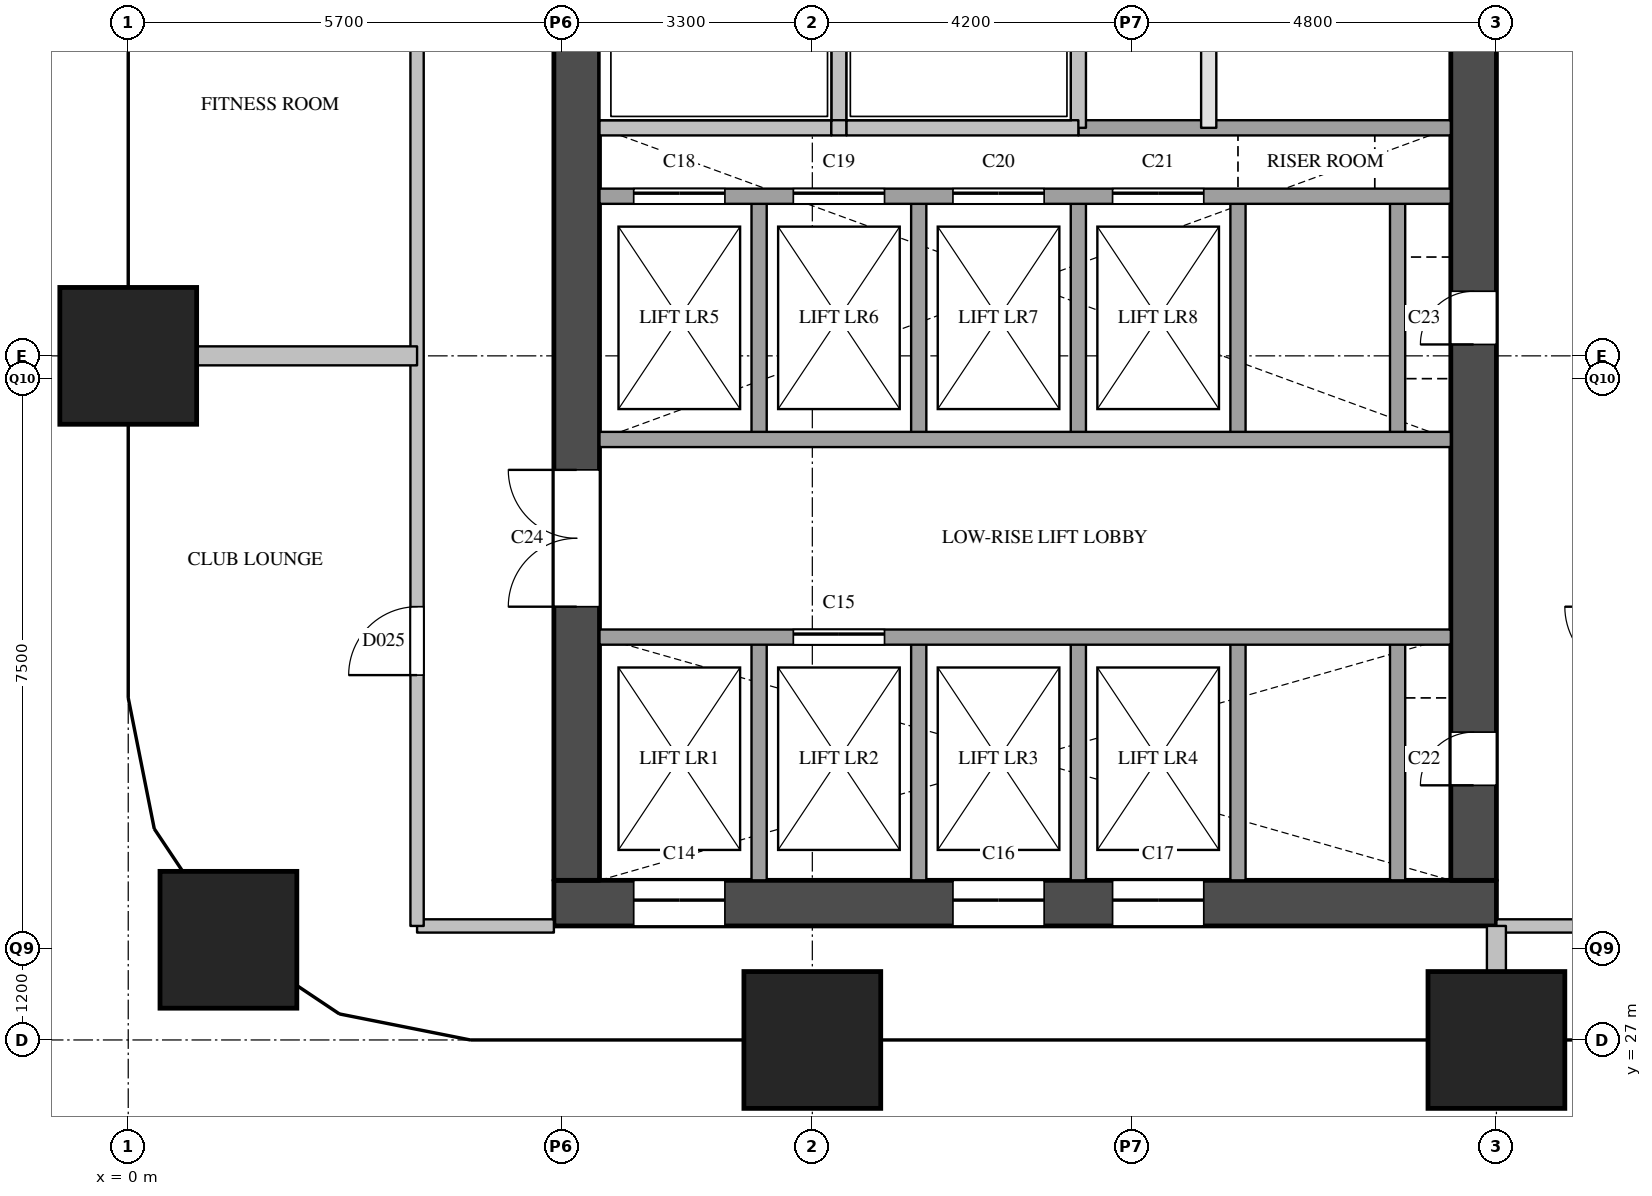
"""IFC4 building model, lengths in metres.
Left out: names, types, materials, properties, quantities, classifications, styles, units other than length and angle.
Written with IfcOpenShell. Run it as: python <this file> out.ifc"""

import sys

from ifc_helpers import new_model, si_unit, direction, frame, frame_2d, origin, origin_2d, place, context, subcontext, project, spatial, rectangle, extrude, element, fill, save


model = new_model("IFC4")
c1 = context("Model", 3, precision=1e-05, world=origin(), true_north=direction((0.0, 1.0)))
c2 = subcontext(c1, "Body", "Model", "MODEL_VIEW")
j1 = project(units=[si_unit("LENGTHUNIT", "METRE"), si_unit("PLANEANGLEUNIT", "RADIAN")], contexts=[c1])
p1 = place(None, origin())
s1 = spatial("IfcSite", under=j1, at=p1, CompositionType="ELEMENT")
p2 = place(p1, origin())
s2 = spatial("IfcBuilding", under=s1, at=p2, CompositionType="ELEMENT")
p3 = place(p2, frame((0.0, 0.0, 112.0)))
s3 = spatial("IfcBuildingStorey", under=s2, at=p3, CompositionType="ELEMENT", Elevation=112.0)
for number, where, z_axis, x_axis in (
    (1, (1.318, 28.318, 0.0), (0.0, 0.0, 1.0), (1.0, 0.0, 0.0)),
    (2, (0.0, 36.0, 0.0), (0.0, 0.0, 1.0), (1.0, 0.0, 0.0)),
    (3, (9.0, 27.0, 0.0), (0.0, 0.0, 1.0), (1.0, 0.0, 0.0)),
    (4, (18.0, 27.0, 0.0), (0.0, 0.0, 1.0), (1.0, 0.0, 0.0)),
):
    element("IfcColumn", number, at=place(p3, frame(where, z_axis=z_axis, x_axis=x_axis)), inside=s3, PredefinedType="COLUMN", context=c2, shape_type="SweptSolid", body=[
        extrude(rectangle(XDim=1.8, YDim=1.8, at=origin_2d()), origin(), (0.0, 0.0, 1.0), 3.8),
    ])
p4 = place(p3, frame((5.6, 28.8, 0.0), z_axis=(0.0, 0.0, 1.0), x_axis=(1.0, 0.0, 0.0)))
e5 = element("IfcWall", 5, at=p4, inside=s3, PredefinedType="SHEAR", context=c2, shape_type="SweptSolid", body=[
    extrude(rectangle(XDim=12.4, YDim=0.6, at=frame_2d((6.2, 0.0))), origin(), (0.0, 0.0, 1.0), 3.5),
])
p5 = place(p4, frame((1.05, 0.0, 0.0)))
e6 = element("IfcOpeningElement", 6, at=p5, cuts=e5, PredefinedType="OPENING", context=c2, shape_type="SweptSolid", body=[
    extrude(rectangle(XDim=1.2, YDim=2.1, at=frame_2d((0.6, 1.05))), frame((0.0, 0.31, 0.0), z_axis=(0.0, -1.0, 0.0), x_axis=(1.0, 0.0, 0.0)), (0.0, 0.0, 1.0), 0.62),
])
p6 = place(p4, frame((5.25, 0.0, 0.0)))
e7 = element("IfcOpeningElement", 7, at=p6, cuts=e5, PredefinedType="OPENING", context=c2, shape_type="SweptSolid", body=[
    extrude(rectangle(XDim=1.2, YDim=2.1, at=frame_2d((0.6, 1.05))), frame((0.0, 0.31, 0.0), z_axis=(0.0, -1.0, 0.0), x_axis=(1.0, 0.0, 0.0)), (0.0, 0.0, 1.0), 0.62),
])
p7 = place(p4, frame((7.35, 0.0, 0.0)))
e8 = element("IfcOpeningElement", 8, at=p7, cuts=e5, PredefinedType="OPENING", context=c2, shape_type="SweptSolid", body=[
    extrude(rectangle(XDim=1.2, YDim=2.1, at=frame_2d((0.6, 1.05))), frame((0.0, 0.31, 0.0), z_axis=(0.0, -1.0, 0.0), x_axis=(1.0, 0.0, 0.0)), (0.0, 0.0, 1.0), 0.62),
])
p8 = place(p3, frame((5.9, 29.1, 0.0), z_axis=(0.0, 0.0, 1.0), x_axis=(0.0, 1.0, 0.0)))
e9 = element("IfcWall", 9, at=p8, inside=s3, PredefinedType="SHEAR", context=c2, shape_type="SweptSolid", body=[
    extrude(rectangle(XDim=20.3, YDim=0.6, at=frame_2d((10.15, 0.0))), origin(), (0.0, 0.0, 1.0), 3.5),
])
p9 = place(p8, frame((3.6, 0.0, 0.0)))
e10 = element("IfcOpeningElement", 10, at=p9, cuts=e9, PredefinedType="OPENING", context=c2, shape_type="SweptSolid", body=[
    extrude(rectangle(XDim=1.8, YDim=2.1, at=frame_2d((0.9, 1.05))), frame((0.0, 0.31, 0.0), z_axis=(0.0, -1.0, 0.0), x_axis=(1.0, 0.0, 0.0)), (0.0, 0.0, 1.0), 0.62),
])
p10 = place(p8, frame((16.4, 0.0, 0.0)))
e11 = element("IfcOpeningElement", 11, at=p10, cuts=e9, PredefinedType="OPENING", context=c2, shape_type="SweptSolid", body=[
    extrude(rectangle(XDim=1.0, YDim=2.1, at=frame_2d((0.5, 1.05))), frame((0.0, 0.31, 0.0), z_axis=(0.0, -1.0, 0.0), x_axis=(1.0, 0.0, 0.0)), (0.0, 0.0, 1.0), 0.62),
])
p11 = place(p3, frame((17.7, 29.1, 0.0), z_axis=(0.0, 0.0, 1.0), x_axis=(0.0, 1.0, 0.0)))
e12 = element("IfcWall", 12, at=p11, inside=s3, PredefinedType="SHEAR", context=c2, shape_type="SweptSolid", body=[
    extrude(rectangle(XDim=20.3, YDim=0.6, at=frame_2d((10.15, 0.0))), origin(), (0.0, 0.0, 1.0), 3.5),
])
p12 = place(p11, frame((1.25, 0.0, 0.0)))
e13 = element("IfcOpeningElement", 13, at=p12, cuts=e12, PredefinedType="OPENING", context=c2, shape_type="SweptSolid", body=[
    extrude(rectangle(XDim=0.7, YDim=2.1, at=frame_2d((0.35, 1.05))), frame((0.0, 0.31, 0.0), z_axis=(0.0, -1.0, 0.0), x_axis=(1.0, 0.0, 0.0)), (0.0, 0.0, 1.0), 0.62),
])
p13 = place(p11, frame((7.05, 0.0, 0.0)))
e14 = element("IfcOpeningElement", 14, at=p13, cuts=e12, PredefinedType="OPENING", context=c2, shape_type="SweptSolid", body=[
    extrude(rectangle(XDim=0.7, YDim=2.1, at=frame_2d((0.35, 1.05))), frame((0.0, 0.31, 0.0), z_axis=(0.0, -1.0, 0.0), x_axis=(1.0, 0.0, 0.0)), (0.0, 0.0, 1.0), 0.62),
])
p14 = place(p3, frame((8.3, 29.1, 0.0), z_axis=(0.0, 0.0, 1.0), x_axis=(0.0, 1.0, 0.0)))
e15 = element("IfcWall", 15, at=p14, inside=s3, PredefinedType="SOLIDWALL", context=c2, shape_type="SweptSolid", body=[
    extrude(rectangle(XDim=3.2, YDim=0.2, at=frame_2d((1.6, 0.0))), origin(), (0.0, 0.0, 1.0), 3.5),
])
p15 = place(p3, frame((8.3, 34.9, 0.0), z_axis=(0.0, 0.0, 1.0), x_axis=(0.0, 1.0, 0.0)))
e16 = element("IfcWall", 16, at=p15, inside=s3, PredefinedType="SOLIDWALL", context=c2, shape_type="SweptSolid", body=[
    extrude(rectangle(XDim=3.2, YDim=0.2, at=frame_2d((1.6, 0.0))), origin(), (0.0, 0.0, 1.0), 3.5),
])
p16 = place(p3, frame((9.35, 39.0, 0.0), z_axis=(0.0, 0.0, 1.0), x_axis=(0.0, 1.0, 0.0)))
e17 = element("IfcWall", 17, at=p16, inside=s3, PredefinedType="SOLIDWALL", context=c2, shape_type="SweptSolid", body=[
    extrude(rectangle(XDim=1.9, YDim=0.2, at=frame_2d((0.95, 0.0))), origin(), (0.0, 0.0, 1.0), 3.5),
])
p17 = place(p3, frame((10.4, 29.1, 0.0), z_axis=(0.0, 0.0, 1.0), x_axis=(0.0, 1.0, 0.0)))
e18 = element("IfcWall", 18, at=p17, inside=s3, PredefinedType="SOLIDWALL", context=c2, shape_type="SweptSolid", body=[
    extrude(rectangle(XDim=3.2, YDim=0.2, at=frame_2d((1.6, 0.0))), origin(), (0.0, 0.0, 1.0), 3.5),
])
p18 = place(p3, frame((10.4, 34.9, 0.0), z_axis=(0.0, 0.0, 1.0), x_axis=(0.0, 1.0, 0.0)))
e19 = element("IfcWall", 19, at=p18, inside=s3, PredefinedType="SOLIDWALL", context=c2, shape_type="SweptSolid", body=[
    extrude(rectangle(XDim=3.2, YDim=0.2, at=frame_2d((1.6, 0.0))), origin(), (0.0, 0.0, 1.0), 3.5),
])
p19 = place(p3, frame((12.5, 29.1, 0.0), z_axis=(0.0, 0.0, 1.0), x_axis=(0.0, 1.0, 0.0)))
e20 = element("IfcWall", 20, at=p19, inside=s3, PredefinedType="SOLIDWALL", context=c2, shape_type="SweptSolid", body=[
    extrude(rectangle(XDim=3.2, YDim=0.2, at=frame_2d((1.6, 0.0))), origin(), (0.0, 0.0, 1.0), 3.5),
])
p20 = place(p3, frame((12.5, 34.9, 0.0), z_axis=(0.0, 0.0, 1.0), x_axis=(0.0, 1.0, 0.0)))
e21 = element("IfcWall", 21, at=p20, inside=s3, PredefinedType="SOLIDWALL", context=c2, shape_type="SweptSolid", body=[
    extrude(rectangle(XDim=3.2, YDim=0.2, at=frame_2d((1.6, 0.0))), origin(), (0.0, 0.0, 1.0), 3.5),
])
p21 = place(p3, frame((12.5, 39.0, 0.0), z_axis=(0.0, 0.0, 1.0), x_axis=(0.0, 1.0, 0.0)))
e22 = element("IfcWall", 22, at=p21, inside=s3, PredefinedType="SOLIDWALL", context=c2, shape_type="SweptSolid", body=[
    extrude(rectangle(XDim=1.9, YDim=0.2, at=frame_2d((0.95, 0.0))), origin(), (0.0, 0.0, 1.0), 3.5),
])
p22 = place(p3, frame((14.215, 39.0, 0.0), z_axis=(0.0, 0.0, 1.0), x_axis=(0.0, 1.0, 0.0)))
e23 = element("IfcWall", 23, at=p22, inside=s3, PredefinedType="PARTITIONING", context=c2, shape_type="SweptSolid", body=[
    extrude(rectangle(XDim=6.2, YDim=0.2, at=frame_2d((3.1, 0.0))), origin(), (0.0, 0.0, 1.0), 3.5),
])
p23 = place(p3, frame((14.6, 29.1, 0.0), z_axis=(0.0, 0.0, 1.0), x_axis=(0.0, 1.0, 0.0)))
e24 = element("IfcWall", 24, at=p23, inside=s3, PredefinedType="SOLIDWALL", context=c2, shape_type="SweptSolid", body=[
    extrude(rectangle(XDim=3.2, YDim=0.2, at=frame_2d((1.6, 0.0))), origin(), (0.0, 0.0, 1.0), 3.5),
])
p24 = place(p3, frame((14.6, 34.9, 0.0), z_axis=(0.0, 0.0, 1.0), x_axis=(0.0, 1.0, 0.0)))
e25 = element("IfcWall", 25, at=p24, inside=s3, PredefinedType="SOLIDWALL", context=c2, shape_type="SweptSolid", body=[
    extrude(rectangle(XDim=3.2, YDim=0.2, at=frame_2d((1.6, 0.0))), origin(), (0.0, 0.0, 1.0), 3.5),
])
p25 = place(p3, frame((16.7, 29.1, 0.0), z_axis=(0.0, 0.0, 1.0), x_axis=(0.0, 1.0, 0.0)))
e26 = element("IfcWall", 26, at=p25, inside=s3, PredefinedType="SOLIDWALL", context=c2, shape_type="SweptSolid", body=[
    extrude(rectangle(XDim=3.2, YDim=0.2, at=frame_2d((1.6, 0.0))), origin(), (0.0, 0.0, 1.0), 3.5),
])
p26 = place(p3, frame((16.7, 34.9, 0.0), z_axis=(0.0, 0.0, 1.0), x_axis=(0.0, 1.0, 0.0)))
e27 = element("IfcWall", 27, at=p26, inside=s3, PredefinedType="SOLIDWALL", context=c2, shape_type="SweptSolid", body=[
    extrude(rectangle(XDim=3.2, YDim=0.2, at=frame_2d((1.6, 0.0))), origin(), (0.0, 0.0, 1.0), 3.5),
])
p27 = place(p3, frame((6.2, 32.3, 0.0), z_axis=(0.0, 0.0, 1.0), x_axis=(1.0, 0.0, 0.0)))
e28 = element("IfcWall", 28, at=p27, inside=s3, PredefinedType="SOLIDWALL", context=c2, shape_type="SweptSolid", body=[
    extrude(rectangle(XDim=11.2, YDim=0.2, at=frame_2d((5.6, 0.0))), origin(), (0.0, 0.0, 1.0), 3.5),
])
p28 = place(p27, frame((2.55, 0.0, 0.0)))
e29 = element("IfcOpeningElement", 29, at=p28, cuts=e28, PredefinedType="OPENING", context=c2, shape_type="SweptSolid", body=[
    extrude(rectangle(XDim=1.2, YDim=2.1, at=frame_2d((0.6, 1.05))), frame((0.0, 0.11, 0.0), z_axis=(0.0, -1.0, 0.0), x_axis=(1.0, 0.0, 0.0)), (0.0, 0.0, 1.0), 0.22),
])
p29 = place(p3, frame((6.2, 34.9, 0.0), z_axis=(0.0, 0.0, 1.0), x_axis=(1.0, 0.0, 0.0)))
e30 = element("IfcWall", 30, at=p29, inside=s3, PredefinedType="SOLIDWALL", context=c2, shape_type="SweptSolid", body=[
    extrude(rectangle(XDim=11.2, YDim=0.2, at=frame_2d((5.6, 0.0))), origin(), (0.0, 0.0, 1.0), 3.5),
])
p30 = place(p3, frame((6.2, 38.1, 0.0), z_axis=(0.0, 0.0, 1.0), x_axis=(1.0, 0.0, 0.0)))
e31 = element("IfcWall", 31, at=p30, inside=s3, PredefinedType="SOLIDWALL", context=c2, shape_type="SweptSolid", body=[
    extrude(rectangle(XDim=11.2, YDim=0.2, at=frame_2d((5.6, 0.0))), origin(), (0.0, 0.0, 1.0), 3.5),
])
p31 = place(p30, frame((0.45, 0.0, 0.0)))
e32 = element("IfcOpeningElement", 32, at=p31, cuts=e31, PredefinedType="OPENING", context=c2, shape_type="SweptSolid", body=[
    extrude(rectangle(XDim=1.2, YDim=2.1, at=frame_2d((0.6, 1.05))), frame((0.0, 0.11, 0.0), z_axis=(0.0, -1.0, 0.0), x_axis=(1.0, 0.0, 0.0)), (0.0, 0.0, 1.0), 0.22),
])
p32 = place(p30, frame((2.55, 0.0, 0.0)))
e33 = element("IfcOpeningElement", 33, at=p32, cuts=e31, PredefinedType="OPENING", context=c2, shape_type="SweptSolid", body=[
    extrude(rectangle(XDim=1.2, YDim=2.1, at=frame_2d((0.6, 1.05))), frame((0.0, 0.11, 0.0), z_axis=(0.0, -1.0, 0.0), x_axis=(1.0, 0.0, 0.0)), (0.0, 0.0, 1.0), 0.22),
])
p33 = place(p30, frame((4.65, 0.0, 0.0)))
e34 = element("IfcOpeningElement", 34, at=p33, cuts=e31, PredefinedType="OPENING", context=c2, shape_type="SweptSolid", body=[
    extrude(rectangle(XDim=1.2, YDim=2.1, at=frame_2d((0.6, 1.05))), frame((0.0, 0.11, 0.0), z_axis=(0.0, -1.0, 0.0), x_axis=(1.0, 0.0, 0.0)), (0.0, 0.0, 1.0), 0.22),
])
p34 = place(p30, frame((6.75, 0.0, 0.0)))
e35 = element("IfcOpeningElement", 35, at=p34, cuts=e31, PredefinedType="OPENING", context=c2, shape_type="SweptSolid", body=[
    extrude(rectangle(XDim=1.2, YDim=2.1, at=frame_2d((0.6, 1.05))), frame((0.0, 0.11, 0.0), z_axis=(0.0, -1.0, 0.0), x_axis=(1.0, 0.0, 0.0)), (0.0, 0.0, 1.0), 0.22),
])
p35 = place(p3, frame((12.5, 39.0, 0.0), z_axis=(0.0, 0.0, 1.0), x_axis=(1.0, 0.0, 0.0)))
e36 = element("IfcWall", 36, at=p35, inside=s3, PredefinedType="SOLIDWALL", context=c2, shape_type="SweptSolid", body=[
    extrude(rectangle(XDim=4.9, YDim=0.2, at=frame_2d((2.45, 0.0))), origin(), (0.0, 0.0, 1.0), 3.5),
])
p36 = place(p3, frame((6.2, 39.0, 0.0), z_axis=(0.0, 0.0, 1.0), x_axis=(1.0, 0.0, 0.0)))
e37 = element("IfcWall", 37, at=p36, inside=s3, PredefinedType="SOLIDWALL", context=c2, shape_type="SweptSolid", body=[
    extrude(rectangle(XDim=3.05, YDim=0.2, at=frame_2d((1.525, 0.0))), origin(), (0.0, 0.0, 1.0), 3.5),
])
p37 = place(p3, frame((9.25, 39.0, 0.0), z_axis=(0.0, 0.0, 1.0), x_axis=(1.0, 0.0, 0.0)))
e38 = element("IfcWall", 38, at=p37, inside=s3, PredefinedType="SOLIDWALL", context=c2, shape_type="SweptSolid", body=[
    extrude(rectangle(XDim=0.2, YDim=0.2, at=frame_2d((0.1, 0.0))), origin(), (0.0, 0.0, 1.0), 3.5),
])
p38 = place(p3, frame((9.45, 39.0, 0.0), z_axis=(0.0, 0.0, 1.0), x_axis=(1.0, 0.0, 0.0)))
e39 = element("IfcWall", 39, at=p38, inside=s3, PredefinedType="SOLIDWALL", context=c2, shape_type="SweptSolid", body=[
    extrude(rectangle(XDim=3.05, YDim=0.2, at=frame_2d((1.525, 0.0))), origin(), (0.0, 0.0, 1.0), 3.5),
])
for number, where, z_axis, x_axis in (
    (40, (3.8, 28.5, 0.0), (0.0, 0.0, 1.0), (1.0, 0.0, 0.0)),
    (41, (18.0, 28.5, 0.0), (0.0, 0.0, 1.0), (1.0, 0.0, 0.0)),
):
    element("IfcWall", number, at=place(p3, frame(where, z_axis=z_axis, x_axis=x_axis)), inside=s3, PredefinedType="PARTITIONING", context=c2, shape_type="SweptSolid", body=[
        extrude(rectangle(XDim=1.8, YDim=0.175, at=frame_2d((0.9, 0.0))), origin(), (0.0, 0.0, 1.0), 3.5),
    ])
p39 = place(p3, frame((3.8, 28.5, 0.0), z_axis=(0.0, 0.0, 1.0), x_axis=(0.0, 1.0, 0.0)))
e42 = element("IfcWall", 42, at=p39, inside=s3, PredefinedType="PARTITIONING", context=c2, shape_type="SweptSolid", body=[
    extrude(rectangle(XDim=23.3, YDim=0.175, at=frame_2d((11.65, 0.0))), origin(), (0.0, 0.0, 1.0), 3.5),
])
p40 = place(p39, frame((3.3, 0.0, 0.0)))
e43 = element("IfcOpeningElement", 43, at=p40, cuts=e42, PredefinedType="OPENING", context=c2, shape_type="SweptSolid", body=[
    extrude(rectangle(XDim=0.9, YDim=2.1, at=frame_2d((0.45, 1.05))), frame((0.0, 0.097, 0.0), z_axis=(0.0, -1.0, 0.0), x_axis=(1.0, 0.0, 0.0)), (0.0, 0.0, 1.0), 0.195),
])
p41 = place(p39, frame((12.45, 0.0, 0.0)))
e44 = element("IfcOpeningElement", 44, at=p41, cuts=e42, PredefinedType="OPENING", context=c2, shape_type="SweptSolid", body=[
    extrude(rectangle(XDim=0.9, YDim=2.1, at=frame_2d((0.45, 1.05))), frame((0.0, 0.097, 0.0), z_axis=(0.0, -1.0, 0.0), x_axis=(1.0, 0.0, 0.0)), (0.0, 0.0, 1.0), 0.195),
])
p42 = place(p39, frame((20.35, 0.0, 0.0)))
e45 = element("IfcOpeningElement", 45, at=p42, cuts=e42, PredefinedType="OPENING", context=c2, shape_type="SweptSolid", body=[
    extrude(rectangle(XDim=0.9, YDim=2.1, at=frame_2d((0.45, 1.05))), frame((0.0, 0.097, 0.0), z_axis=(0.0, -1.0, 0.0), x_axis=(1.0, 0.0, 0.0)), (0.0, 0.0, 1.0), 0.195),
])
p43 = place(p3, frame((0.0, 36.0, 0.0), z_axis=(0.0, 0.0, 1.0), x_axis=(1.0, 0.0, 0.0)))
e46 = element("IfcWall", 46, at=p43, inside=s3, PredefinedType="PARTITIONING", context=c2, shape_type="SweptSolid", body=[
    extrude(rectangle(XDim=3.8, YDim=0.25, at=frame_2d((1.9, 0.0))), origin(), (0.0, 0.0, 1.0), 3.5),
])
p44 = place(p3, frame((18.0, 27.0, 0.0), z_axis=(0.0, 0.0, 1.0), x_axis=(0.0, 1.0, 0.0)))
e47 = element("IfcWall", 47, at=p44, inside=s3, PredefinedType="PARTITIONING", context=c2, shape_type="SweptSolid", body=[
    extrude(rectangle(XDim=1.5, YDim=0.25, at=frame_2d((0.75, 0.0))), origin(), (0.0, 0.0, 1.0), 3.5),
])
p45 = place(p5, origin())
e48 = element("IfcDoor", 48, at=p45, inside=s3, OperationType="SLIDING_TO_LEFT", PredefinedType="DOOR", context=c2, shape_type="SweptSolid", body=[
    extrude(rectangle(XDim=1.2, YDim=2.1, at=frame_2d((0.6, 1.05))), frame((0.0, 0.025, 0.0), z_axis=(0.0, -1.0, 0.0), x_axis=(1.0, 0.0, 0.0)), (0.0, 0.0, 1.0), 0.05),
])
fill(e6, e48)
p46 = place(p28, origin())
e49 = element("IfcDoor", 49, at=p46, inside=s3, OperationType="SLIDING_TO_LEFT", PredefinedType="DOOR", context=c2, shape_type="SweptSolid", body=[
    extrude(rectangle(XDim=1.2, YDim=2.1, at=frame_2d((0.6, 1.05))), frame((0.0, 0.025, 0.0), z_axis=(0.0, -1.0, 0.0), x_axis=(1.0, 0.0, 0.0)), (0.0, 0.0, 1.0), 0.05),
])
fill(e29, e49)
p47 = place(p6, origin())
e50 = element("IfcDoor", 50, at=p47, inside=s3, OperationType="SLIDING_TO_LEFT", PredefinedType="DOOR", context=c2, shape_type="SweptSolid", body=[
    extrude(rectangle(XDim=1.2, YDim=2.1, at=frame_2d((0.6, 1.05))), frame((0.0, 0.025, 0.0), z_axis=(0.0, -1.0, 0.0), x_axis=(1.0, 0.0, 0.0)), (0.0, 0.0, 1.0), 0.05),
])
fill(e7, e50)
p48 = place(p7, origin())
e51 = element("IfcDoor", 51, at=p48, inside=s3, OperationType="SLIDING_TO_LEFT", PredefinedType="DOOR", context=c2, shape_type="SweptSolid", body=[
    extrude(rectangle(XDim=1.2, YDim=2.1, at=frame_2d((0.6, 1.05))), frame((0.0, 0.025, 0.0), z_axis=(0.0, -1.0, 0.0), x_axis=(1.0, 0.0, 0.0)), (0.0, 0.0, 1.0), 0.05),
])
fill(e8, e51)
p49 = place(p31, origin())
e52 = element("IfcDoor", 52, at=p49, inside=s3, OperationType="SLIDING_TO_LEFT", PredefinedType="DOOR", context=c2, shape_type="SweptSolid", body=[
    extrude(rectangle(XDim=1.2, YDim=2.1, at=frame_2d((0.6, 1.05))), frame((0.0, 0.025, 0.0), z_axis=(0.0, -1.0, 0.0), x_axis=(1.0, 0.0, 0.0)), (0.0, 0.0, 1.0), 0.05),
])
fill(e32, e52)
p50 = place(p32, origin())
e53 = element("IfcDoor", 53, at=p50, inside=s3, OperationType="SLIDING_TO_LEFT", PredefinedType="DOOR", context=c2, shape_type="SweptSolid", body=[
    extrude(rectangle(XDim=1.2, YDim=2.1, at=frame_2d((0.6, 1.05))), frame((0.0, 0.025, 0.0), z_axis=(0.0, -1.0, 0.0), x_axis=(1.0, 0.0, 0.0)), (0.0, 0.0, 1.0), 0.05),
])
fill(e33, e53)
p51 = place(p33, origin())
e54 = element("IfcDoor", 54, at=p51, inside=s3, OperationType="SLIDING_TO_LEFT", PredefinedType="DOOR", context=c2, shape_type="SweptSolid", body=[
    extrude(rectangle(XDim=1.2, YDim=2.1, at=frame_2d((0.6, 1.05))), frame((0.0, 0.025, 0.0), z_axis=(0.0, -1.0, 0.0), x_axis=(1.0, 0.0, 0.0)), (0.0, 0.0, 1.0), 0.05),
])
fill(e34, e54)
p52 = place(p34, origin())
e55 = element("IfcDoor", 55, at=p52, inside=s3, OperationType="SLIDING_TO_LEFT", PredefinedType="DOOR", context=c2, shape_type="SweptSolid", body=[
    extrude(rectangle(XDim=1.2, YDim=2.1, at=frame_2d((0.6, 1.05))), frame((0.0, 0.025, 0.0), z_axis=(0.0, -1.0, 0.0), x_axis=(1.0, 0.0, 0.0)), (0.0, 0.0, 1.0), 0.05),
])
fill(e35, e55)
p53 = place(p12, origin())
e56 = element("IfcDoor", 56, at=p53, inside=s3, OperationType="SINGLE_SWING_LEFT", PredefinedType="DOOR", context=c2, shape_type="SweptSolid", body=[
    extrude(rectangle(XDim=0.7, YDim=2.1, at=frame_2d((0.35, 1.05))), frame((0.0, 0.025, 0.0), z_axis=(0.0, -1.0, 0.0), x_axis=(1.0, 0.0, 0.0)), (0.0, 0.0, 1.0), 0.05),
])
fill(e13, e56)
p54 = place(p13, origin())
e57 = element("IfcDoor", 57, at=p54, inside=s3, OperationType="SINGLE_SWING_LEFT", PredefinedType="DOOR", context=c2, shape_type="SweptSolid", body=[
    extrude(rectangle(XDim=0.7, YDim=2.1, at=frame_2d((0.35, 1.05))), frame((0.0, 0.025, 0.0), z_axis=(0.0, -1.0, 0.0), x_axis=(1.0, 0.0, 0.0)), (0.0, 0.0, 1.0), 0.05),
])
fill(e14, e57)
p55 = place(p9, origin())
e58 = element("IfcDoor", 58, at=p55, inside=s3, OperationType="DOUBLE_DOOR_SINGLE_SWING", PredefinedType="DOOR", context=c2, shape_type="SweptSolid", body=[
    extrude(rectangle(XDim=1.8, YDim=2.1, at=frame_2d((0.9, 1.05))), frame((0.0, 0.025, 0.0), z_axis=(0.0, -1.0, 0.0), x_axis=(1.0, 0.0, 0.0)), (0.0, 0.0, 1.0), 0.05),
])
fill(e10, e58)
p56 = place(p40, origin())
e59 = element("IfcDoor", 59, at=p56, inside=s3, OperationType="SINGLE_SWING_LEFT", PredefinedType="DOOR", context=c2, shape_type="SweptSolid", body=[
    extrude(rectangle(XDim=0.9, YDim=2.1, at=frame_2d((0.45, 1.05))), frame((0.0, 0.025, 0.0), z_axis=(0.0, -1.0, 0.0), x_axis=(1.0, 0.0, 0.0)), (0.0, 0.0, 1.0), 0.05),
])
fill(e43, e59)
save(model, sys.argv[1])
